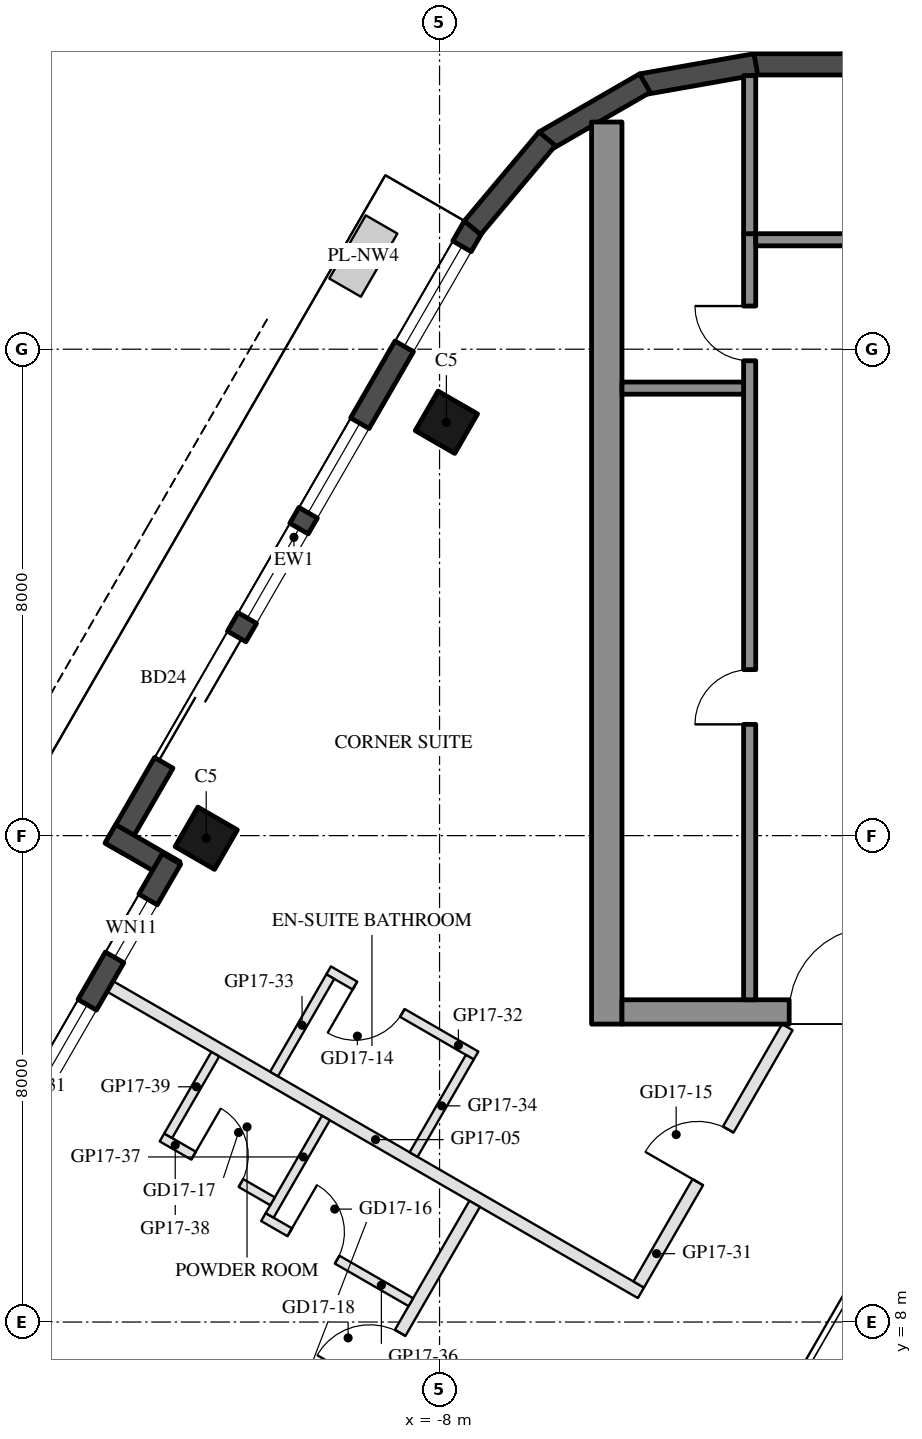
"""IFC4 building model, lengths in metres.
Left out: names, types, materials, properties, quantities, classifications, styles, units other than length and angle.
Written with IfcOpenShell. Run it as: python <this file> out.ifc"""

import sys

from ifc_helpers import new_model, si_unit, direction, frame, frame_2d, origin, origin_2d, place, context, subcontext, project, spatial, rectangle, hollow_rectangle, extrude, element, fill, save


model = new_model("IFC4")
c1 = context("Model", 3, precision=1e-05, world=origin(), true_north=direction((0.0, 1.0)))
c2 = subcontext(c1, "Body", "Model", "MODEL_VIEW")
j1 = project(units=[si_unit("LENGTHUNIT", "METRE"), si_unit("PLANEANGLEUNIT", "RADIAN")], contexts=[c1])
p1 = place(None, origin())
s1 = spatial("IfcSite", under=j1, at=p1, CompositionType="ELEMENT")
p2 = place(p1, origin())
s2 = spatial("IfcBuilding", under=s1, at=p2, CompositionType="ELEMENT")
p3 = place(p2, frame((0.0, 0.0, 187.3)))
s3 = spatial("IfcBuildingStorey", under=s2, at=p3, CompositionType="ELEMENT", Elevation=187.3)
for number, where, z_axis, x_axis in (
    (1, (-7.888, 22.798, 0.0), (0.0, 0.0, 1.0), (0.5, 0.866, 0.0)),
    (2, (-11.838, 15.957, 0.0), (0.0, 0.0, 1.0), (0.5, 0.866, 0.0)),
):
    element("IfcColumn", number, at=place(p3, frame(where, z_axis=z_axis, x_axis=x_axis)), inside=s3, PredefinedType="COLUMN", context=c2, shape_type="SweptSolid", body=[
        extrude(hollow_rectangle(XDim=0.75, YDim=0.75, WallThickness=0.035, at=origin_2d()), origin(), (0.0, 0.0, 1.0), 3.7),
    ])
p4 = place(p3, frame((-7.441, 26.022, 0.0), z_axis=(0.0, 0.0, 1.0), x_axis=(-0.499992533062, -0.86602971478, 0.0)))
e3 = element("IfcWall", 3, at=p4, inside=s3, PredefinedType="SOLIDWALL", context=c2, shape_type="SweptSolid", body=[
    extrude(rectangle(XDim=11.816, YDim=0.35, at=frame_2d((5.908, 0.0))), origin(), (0.0, 0.0, 1.0), 3.55),
])
p5 = place(p4, frame((0.381, 0.0, 0.3)))
e4 = element("IfcOpeningElement", 4, at=p5, cuts=e3, PredefinedType="OPENING", context=c2, shape_type="SweptSolid", body=[
    extrude(rectangle(XDim=1.9, YDim=2.65, at=frame_2d((0.95, 1.325))), frame((0.0, 0.185, 0.0), z_axis=(0.0, -1.0, 0.0), x_axis=(1.0, 0.0, 0.0)), (0.0, 0.0, 1.0), 0.37),
])
p6 = place(p4, frame((7.791, 0.0, 0.0)))
e5 = element("IfcOpeningElement", 5, at=p6, cuts=e3, PredefinedType="OPENING", context=c2, shape_type="SweptSolid", body=[
    extrude(rectangle(XDim=2.4, YDim=2.4, at=frame_2d((1.2, 1.2))), frame((0.0, 0.185, 0.0), z_axis=(0.0, -1.0, 0.0), x_axis=(1.0, 0.0, 0.0)), (0.0, 0.0, 1.0), 0.37),
])
p7 = place(p4, frame((3.741, 0.0, 0.3)))
e6 = element("IfcOpeningElement", 6, at=p7, cuts=e3, PredefinedType="OPENING", context=c2, shape_type="SweptSolid", body=[
    extrude(rectangle(XDim=1.7, YDim=2.65, at=frame_2d((0.85, 1.325))), frame((0.0, 0.185, 0.0), z_axis=(0.0, -1.0, 0.0), x_axis=(1.0, 0.0, 0.0)), (0.0, 0.0, 1.0), 0.37),
])
p8 = place(p4, frame((5.741, 0.0, 0.3)))
e7 = element("IfcOpeningElement", 7, at=p8, cuts=e3, PredefinedType="OPENING", context=c2, shape_type="SweptSolid", body=[
    extrude(rectangle(XDim=1.7, YDim=2.65, at=frame_2d((0.85, 1.325))), frame((0.0, 0.185, 0.0), z_axis=(0.0, -1.0, 0.0), x_axis=(1.0, 0.0, 0.0)), (0.0, 0.0, 1.0), 0.37),
])
p9 = place(p3, frame((-13.413, 16.029, 0.0), z_axis=(0.0, 0.0, 1.0), x_axis=(0.866005645448, -0.500034220881, 0.0)))
e8 = element("IfcWall", 8, at=p9, inside=s3, PredefinedType="SOLIDWALL", context=c2, shape_type="SweptSolid", body=[
    extrude(rectangle(XDim=1.22, YDim=0.35, at=frame_2d((0.61, 0.0))), origin(), (0.0, 0.0, 1.0), 3.55),
])
p10 = place(p3, frame((-12.409, 15.617, 0.0), z_axis=(0.0, 0.0, 1.0), x_axis=(-0.500003597184, -0.866023326939, 0.0)))
e9 = element("IfcWall", 9, at=p10, inside=s3, PredefinedType="SOLIDWALL", context=c2, shape_type="SweptSolid", body=[
    extrude(rectangle(XDim=6.74, YDim=0.35, at=frame_2d((3.37, 0.0))), origin(), (0.0, 0.0, 1.0), 3.55),
])
p11 = place(p10, frame((0.77, 0.0, 0.3)))
e10 = element("IfcOpeningElement", 10, at=p11, cuts=e9, PredefinedType="OPENING", context=c2, shape_type="SweptSolid", body=[
    extrude(rectangle(XDim=1.1, YDim=2.65, at=frame_2d((0.55, 1.325))), frame((0.0, 0.185, 0.0), z_axis=(0.0, -1.0, 0.0), x_axis=(1.0, 0.0, 0.0)), (0.0, 0.0, 1.0), 0.37),
])
p12 = place(p10, frame((2.77, 0.0, 0.3)))
e11 = element("IfcOpeningElement", 11, at=p12, cuts=e9, PredefinedType="OPENING", context=c2, shape_type="SweptSolid", body=[
    extrude(rectangle(XDim=3.1, YDim=2.65, at=frame_2d((1.55, 1.325))), frame((0.0, 0.185, 0.0), z_axis=(0.0, -1.0, 0.0), x_axis=(1.0, 0.0, 0.0)), (0.0, 0.0, 1.0), 0.37),
])
p13 = place(p3, frame((2.829, 28.685, 0.0), z_axis=(0.0, 0.0, 1.0), x_axis=(-1.0, 0.0, 0.0)))
e12 = element("IfcWall", 12, at=p13, inside=s3, PredefinedType="SOLIDWALL", context=c2, shape_type="SweptSolid", body=[
    extrude(rectangle(XDim=5.658, YDim=0.35, at=frame_2d((2.829, 0.0))), origin(), (0.0, 0.0, 1.0), 3.55),
])
for number, where, z_axis, x_axis in (
    (13, (-2.799, 28.688, 0.0), (0.0, 0.0, 1.0), (-0.985, -0.174, 0.0)),
    (14, (-4.623, 28.377, 0.0), (0.0, 0.0, 1.0), (-0.866, -0.5, 0.0)),
):
    element("IfcWall", number, at=place(p3, frame(where, z_axis=z_axis, x_axis=x_axis)), inside=s3, PredefinedType="SOLIDWALL", context=c2, shape_type="SweptSolid", body=[
        extrude(rectangle(XDim=1.91, YDim=0.35, at=frame_2d((0.955, 0.0))), origin(), (0.0, 0.0, 1.0), 3.55),
    ])
p14 = place(p3, frame((-6.23, 27.461, 0.0), z_axis=(0.0, 0.0, 1.0), x_axis=(-0.642808304945, -0.766027077259, 0.0)))
e15 = element("IfcWall", 15, at=p14, inside=s3, PredefinedType="SOLIDWALL", context=c2, shape_type="SweptSolid", body=[
    extrude(rectangle(XDim=1.91, YDim=0.35, at=frame_2d((0.955, 0.0))), origin(), (0.0, 0.0, 1.0), 3.55),
])
p15 = place(p3, frame((-5.25, 12.9, 0.0), z_axis=(0.0, 0.0, 1.0), x_axis=(0.0, 1.0, 0.0)))
e16 = element("IfcWall", 16, at=p15, inside=s3, PredefinedType="SHEAR", context=c2, shape_type="SweptSolid", body=[
    extrude(rectangle(XDim=14.837, YDim=0.5, at=frame_2d((7.418, 0.0))), origin(), (0.0, 0.0, 1.0), 3.5),
])
p16 = place(p3, frame((5.0, 13.1, 0.0), z_axis=(0.0, 0.0, 1.0), x_axis=(-1.0, 0.0, 0.0)))
e17 = element("IfcWall", 17, at=p16, inside=s3, PredefinedType="SHEAR", context=c2, shape_type="SweptSolid", body=[
    extrude(rectangle(XDim=10.0, YDim=0.4, at=frame_2d((5.0, 0.0))), origin(), (0.0, 0.0, 1.0), 3.5),
])
p17 = place(p16, frame((3.55, 0.0, 0.0)))
e18 = element("IfcOpeningElement", 18, at=p17, cuts=e17, PredefinedType="OPENING", context=c2, shape_type="SweptSolid", body=[
    extrude(rectangle(XDim=1.1, YDim=2.1, at=frame_2d((0.55, 1.05))), frame((0.0, 0.21, 0.0), z_axis=(0.0, -1.0, 0.0), x_axis=(1.0, 0.0, 0.0)), (0.0, 0.0, 1.0), 0.42),
])
p18 = place(p16, frame((5.85, 0.0, 0.0)))
e19 = element("IfcOpeningElement", 19, at=p18, cuts=e17, PredefinedType="OPENING", context=c2, shape_type="SweptSolid", body=[
    extrude(rectangle(XDim=1.4, YDim=2.1, at=frame_2d((0.7, 1.05))), frame((0.0, 0.21, 0.0), z_axis=(0.0, -1.0, 0.0), x_axis=(1.0, 0.0, 0.0)), (0.0, 0.0, 1.0), 0.42),
])
p19 = place(p3, frame((-2.9, 13.3, 0.0), z_axis=(0.0, 0.0, 1.0), x_axis=(0.0, 1.0, 0.0)))
e20 = element("IfcWall", 20, at=p19, inside=s3, PredefinedType="SHEAR", context=c2, shape_type="SweptSolid", body=[
    extrude(rectangle(XDim=12.6, YDim=0.2, at=frame_2d((6.3, 0.0))), origin(), (0.0, 0.0, 1.0), 3.5),
])
p20 = place(p19, frame((4.53, 0.0, 0.0)))
e21 = element("IfcOpeningElement", 21, at=p20, cuts=e20, PredefinedType="OPENING", context=c2, shape_type="SweptSolid", body=[
    extrude(rectangle(XDim=0.9, YDim=2.1, at=frame_2d((0.45, 1.05))), frame((0.0, 0.11, 0.0), z_axis=(0.0, -1.0, 0.0), x_axis=(1.0, 0.0, 0.0)), (0.0, 0.0, 1.0), 0.22),
])
p21 = place(p19, frame((10.51, 0.0, 0.0)))
e22 = element("IfcOpeningElement", 22, at=p21, cuts=e20, PredefinedType="OPENING", context=c2, shape_type="SweptSolid", body=[
    extrude(rectangle(XDim=0.9, YDim=2.1, at=frame_2d((0.45, 1.05))), frame((0.0, 0.11, 0.0), z_axis=(0.0, -1.0, 0.0), x_axis=(1.0, 0.0, 0.0)), (0.0, 0.0, 1.0), 0.22),
])
p22 = place(p3, frame((-0.4, 25.8, 0.0), z_axis=(0.0, 0.0, 1.0), x_axis=(-1.0, 0.0, 0.0)))
e23 = element("IfcWall", 23, at=p22, inside=s3, PredefinedType="SHEAR", context=c2, shape_type="SweptSolid", body=[
    extrude(rectangle(XDim=2.4, YDim=0.2, at=frame_2d((1.2, 0.0))), origin(), (0.0, 0.0, 1.0), 3.5),
])
p23 = place(p3, frame((-3.0, 23.36, 0.0), z_axis=(0.0, 0.0, 1.0), x_axis=(-1.0, 0.0, 0.0)))
e24 = element("IfcWall", 24, at=p23, inside=s3, PredefinedType="SHEAR", context=c2, shape_type="SweptSolid", body=[
    extrude(rectangle(XDim=2.0, YDim=0.2, at=frame_2d((1.0, 0.0))), origin(), (0.0, 0.0, 1.0), 3.5),
])
p24 = place(p3, frame((-2.9, 25.9, 0.0), z_axis=(0.0, 0.0, 1.0), x_axis=(0.0, 1.0, 0.0)))
e25 = element("IfcWall", 25, at=p24, inside=s3, PredefinedType="SHEAR", context=c2, shape_type="SweptSolid", body=[
    extrude(rectangle(XDim=2.6, YDim=0.2, at=frame_2d((1.3, 0.0))), origin(), (0.0, 0.0, 1.0), 3.5),
])
p25 = place(p3, frame((-13.417, 13.52, 0.0), z_axis=(0.0, 0.0, 1.0), x_axis=(0.866022637375, -0.500004791531, 0.0)))
e26 = element("IfcWall", 26, at=p25, inside=s3, PredefinedType="PARTITIONING", context=c2, shape_type="SweptSolid", body=[
    extrude(rectangle(XDim=10.08, YDim=0.2, at=frame_2d((5.04, 0.0))), origin(), (0.0, 0.0, 1.0), 3.06),
])
p26 = place(p3, frame((-4.725, 8.617, 0.0), z_axis=(0.0, 0.0, 1.0), x_axis=(0.499990498062, 0.866030889661, 0.0)))
e27 = element("IfcWall", 27, at=p26, inside=s3, PredefinedType="PARTITIONING", context=c2, shape_type="SweptSolid", body=[
    extrude(rectangle(XDim=4.888, YDim=0.2, at=frame_2d((2.444, 0.0))), origin(), (0.0, 0.0, 1.0), 2.95),
])
p27 = place(p26, frame((1.944, 0.0, 0.0)))
e28 = element("IfcOpeningElement", 28, at=p27, cuts=e27, PredefinedType="OPENING", context=c2, shape_type="SweptSolid", body=[
    extrude(rectangle(XDim=1.0, YDim=2.1, at=frame_2d((0.5, 1.05))), frame((0.0, 0.11, 0.0), z_axis=(0.0, -1.0, 0.0), x_axis=(1.0, 0.0, 0.0)), (0.0, 0.0, 1.0), 0.22),
])
p28 = place(p3, frame((-7.399, 12.384, 0.0), z_axis=(0.0, 0.0, 1.0), x_axis=(-0.866034573852, 0.49998411664, 0.0)))
e29 = element("IfcWall", 29, at=p28, inside=s3, PredefinedType="PARTITIONING", context=c2, shape_type="SweptSolid", body=[
    extrude(rectangle(XDim=2.8, YDim=0.15, at=frame_2d((1.4, 0.0))), origin(), (0.0, 0.0, 1.0), 3.55),
])
p29 = place(p28, frame((1.4, 0.0, 0.0)))
e30 = element("IfcOpeningElement", 30, at=p29, cuts=e29, PredefinedType="OPENING", context=c2, shape_type="SweptSolid", body=[
    extrude(rectangle(XDim=0.9, YDim=2.1, at=frame_2d((0.45, 1.05))), frame((0.0, 0.085, 0.0), z_axis=(0.0, -1.0, 0.0), x_axis=(1.0, 0.0, 0.0)), (0.0, 0.0, 1.0), 0.17),
])
for number, where, z_axis, x_axis in (
    (31, (-9.797, 13.681, 0.0), (0.0, 0.0, 1.0), (-0.5, -0.866, 0.0)),
    (32, (-7.502, 12.356, 0.0), (0.0, 0.0, 1.0), (-0.5, -0.866, 0.0)),
):
    element("IfcWall", number, at=place(p3, frame(where, z_axis=z_axis, x_axis=x_axis)), inside=s3, PredefinedType="PARTITIONING", context=c2, shape_type="SweptSolid", body=[
        extrude(rectangle(XDim=1.85, YDim=0.15, at=frame_2d((0.925, 0.0))), origin(), (0.0, 0.0, 1.0), 3.55),
    ])
p30 = place(p3, frame((-12.823, 0.591, 0.0), z_axis=(0.0, 0.0, 1.0), x_axis=(0.500012057535, 0.866018442252, 0.0)))
e33 = element("IfcWall", 33, at=p30, inside=s3, PredefinedType="PARTITIONING", context=c2, shape_type="SweptSolid", body=[
    extrude(rectangle(XDim=10.8, YDim=0.2, at=frame_2d((5.4, 0.0))), origin(), (0.0, 0.0, 1.0), 2.95),
])
p31 = place(p30, frame((7.35, 0.0, 0.0)))
e34 = element("IfcOpeningElement", 34, at=p31, cuts=e33, PredefinedType="OPENING", context=c2, shape_type="SweptSolid", body=[
    extrude(rectangle(XDim=1.0, YDim=2.1, at=frame_2d((0.5, 1.05))), frame((0.0, 0.11, 0.0), z_axis=(0.0, -1.0, 0.0), x_axis=(1.0, 0.0, 0.0)), (0.0, 0.0, 1.0), 0.22),
])
p32 = place(p3, frame((-10.897, 9.726, 0.0), z_axis=(0.0, 0.0, 1.0), x_axis=(0.866056369097, -0.49994636267, 0.0)))
e35 = element("IfcWall", 35, at=p32, inside=s3, PredefinedType="PARTITIONING", context=c2, shape_type="SweptSolid", body=[
    extrude(rectangle(XDim=2.8, YDim=0.15, at=frame_2d((1.4, 0.0))), origin(), (0.0, 0.0, 1.0), 3.55),
])
p33 = place(p32, frame((0.5, 0.0, 0.0)))
e36 = element("IfcOpeningElement", 36, at=p33, cuts=e35, PredefinedType="OPENING", context=c2, shape_type="SweptSolid", body=[
    extrude(rectangle(XDim=0.9, YDim=2.1, at=frame_2d((0.45, 1.05))), frame((0.0, 0.085, 0.0), z_axis=(0.0, -1.0, 0.0), x_axis=(1.0, 0.0, 0.0)), (0.0, 0.0, 1.0), 0.17),
])
p34 = place(p3, frame((-9.869, 11.356, 0.0), z_axis=(0.0, 0.0, 1.0), x_axis=(-0.500042316284, -0.866000971088, 0.0)))
e37 = element("IfcWall", 37, at=p34, inside=s3, PredefinedType="PARTITIONING", context=c2, shape_type="SweptSolid", body=[
    extrude(rectangle(XDim=1.85, YDim=0.15, at=frame_2d((0.925, 0.0))), origin(), (0.0, 0.0, 1.0), 2.95),
])
p35 = place(p3, frame((-12.565, 11.036, 0.0), z_axis=(0.0, 0.0, 1.0), x_axis=(0.866009402589, -0.500027713859, 0.0)))
e38 = element("IfcWall", 38, at=p35, inside=s3, PredefinedType="PARTITIONING", context=c2, shape_type="SweptSolid", body=[
    extrude(rectangle(XDim=2.1, YDim=0.15, at=frame_2d((1.05, 0.0))), origin(), (0.0, 0.0, 1.0), 3.55),
])
p36 = place(p35, frame((0.6, 0.0, 0.0)))
e39 = element("IfcOpeningElement", 39, at=p36, cuts=e38, PredefinedType="OPENING", context=c2, shape_type="SweptSolid", body=[
    extrude(rectangle(XDim=0.9, YDim=2.1, at=frame_2d((0.45, 1.05))), frame((0.0, 0.085, 0.0), z_axis=(0.0, -1.0, 0.0), x_axis=(1.0, 0.0, 0.0)), (0.0, 0.0, 1.0), 0.17),
])
p37 = place(p3, frame((-11.688, 12.406, 0.0), z_axis=(0.0, 0.0, 1.0), x_axis=(-0.499967891604, -0.866043940782, 0.0)))
e40 = element("IfcWall", 40, at=p37, inside=s3, PredefinedType="PARTITIONING", context=c2, shape_type="SweptSolid", body=[
    extrude(rectangle(XDim=1.55, YDim=0.15, at=frame_2d((0.775, 0.0))), origin(), (0.0, 0.0, 1.0), 2.95),
])
p38 = place(p5, origin())
e41 = element("IfcWindow", 41, at=p38, inside=s3, PartitioningType="SINGLE_PANEL", PredefinedType="WINDOW", context=c2, shape_type="SweptSolid", body=[
    extrude(rectangle(XDim=1.9, YDim=2.65, at=frame_2d((0.95, 1.325))), frame((0.0, 0.03, 0.0), z_axis=(0.0, -1.0, 0.0), x_axis=(1.0, 0.0, 0.0)), (0.0, 0.0, 1.0), 0.06),
])
fill(e4, e41)
p39 = place(p6, frame((2.4, 0.0, 0.0), z_axis=(0.0, 0.0, 1.0), x_axis=(-1.0, 0.0, 0.0)))
e42 = element("IfcDoor", 42, at=p39, inside=s3, OperationType="SLIDING_TO_LEFT", PredefinedType="DOOR", context=c2, shape_type="SweptSolid", body=[
    extrude(rectangle(XDim=2.4, YDim=2.4, at=frame_2d((1.2, 1.2))), frame((0.0, 0.025, 0.0), z_axis=(0.0, -1.0, 0.0), x_axis=(1.0, 0.0, 0.0)), (0.0, 0.0, 1.0), 0.05),
])
fill(e5, e42)
p40 = place(p7, origin())
e43 = element("IfcWindow", 43, at=p40, inside=s3, PartitioningType="SINGLE_PANEL", PredefinedType="WINDOW", context=c2, shape_type="SweptSolid", body=[
    extrude(rectangle(XDim=1.7, YDim=2.65, at=frame_2d((0.85, 1.325))), frame((0.0, 0.03, 0.0), z_axis=(0.0, -1.0, 0.0), x_axis=(1.0, 0.0, 0.0)), (0.0, 0.0, 1.0), 0.06),
])
fill(e6, e43)
p41 = place(p8, origin())
e44 = element("IfcWindow", 44, at=p41, inside=s3, PartitioningType="SINGLE_PANEL", PredefinedType="WINDOW", context=c2, shape_type="SweptSolid", body=[
    extrude(rectangle(XDim=1.7, YDim=2.65, at=frame_2d((0.85, 1.325))), frame((0.0, 0.03, 0.0), z_axis=(0.0, -1.0, 0.0), x_axis=(1.0, 0.0, 0.0)), (0.0, 0.0, 1.0), 0.06),
])
fill(e7, e44)
p42 = place(p11, origin())
e45 = element("IfcWindow", 45, at=p42, inside=s3, PartitioningType="SINGLE_PANEL", PredefinedType="WINDOW", context=c2, shape_type="SweptSolid", body=[
    extrude(rectangle(XDim=1.1, YDim=2.65, at=frame_2d((0.55, 1.325))), frame((0.0, 0.03, 0.0), z_axis=(0.0, -1.0, 0.0), x_axis=(1.0, 0.0, 0.0)), (0.0, 0.0, 1.0), 0.06),
])
fill(e10, e45)
p43 = place(p12, origin())
e46 = element("IfcWindow", 46, at=p43, inside=s3, PartitioningType="SINGLE_PANEL", PredefinedType="WINDOW", context=c2, shape_type="SweptSolid", body=[
    extrude(rectangle(XDim=3.1, YDim=2.65, at=frame_2d((1.55, 1.325))), frame((0.0, 0.03, 0.0), z_axis=(0.0, -1.0, 0.0), x_axis=(1.0, 0.0, 0.0)), (0.0, 0.0, 1.0), 0.06),
])
fill(e11, e46)
p44 = place(p20, origin())
e47 = element("IfcDoor", 47, at=p44, inside=s3, OperationType="SINGLE_SWING_LEFT", PredefinedType="DOOR", context=c2, shape_type="SweptSolid", body=[
    extrude(rectangle(XDim=0.9, YDim=2.1, at=frame_2d((0.45, 1.05))), frame((0.0, 0.025, 0.0), z_axis=(0.0, -1.0, 0.0), x_axis=(1.0, 0.0, 0.0)), (0.0, 0.0, 1.0), 0.05),
])
fill(e21, e47)
p45 = place(p21, origin())
e48 = element("IfcDoor", 48, at=p45, inside=s3, OperationType="SINGLE_SWING_RIGHT", PredefinedType="DOOR", context=c2, shape_type="SweptSolid", body=[
    extrude(rectangle(XDim=0.9, YDim=2.1, at=frame_2d((0.45, 1.05))), frame((0.0, 0.025, 0.0), z_axis=(0.0, -1.0, 0.0), x_axis=(1.0, 0.0, 0.0)), (0.0, 0.0, 1.0), 0.05),
])
fill(e22, e48)
p46 = place(p18, frame((1.4, 0.0, 0.0), z_axis=(0.0, 0.0, 1.0), x_axis=(-1.0, 0.0, 0.0)))
e49 = element("IfcDoor", 49, at=p46, inside=s3, OperationType="DOUBLE_DOOR_SINGLE_SWING", PredefinedType="DOOR", context=c2, shape_type="SweptSolid", body=[
    extrude(rectangle(XDim=1.4, YDim=2.1, at=frame_2d((0.7, 1.05))), frame((0.0, 0.025, 0.0), z_axis=(0.0, -1.0, 0.0), x_axis=(1.0, 0.0, 0.0)), (0.0, 0.0, 1.0), 0.05),
])
fill(e19, e49)
p47 = place(p29, origin())
e50 = element("IfcDoor", 50, at=p47, inside=s3, OperationType="SINGLE_SWING_RIGHT", PredefinedType="DOOR", context=c2, shape_type="SweptSolid", body=[
    extrude(rectangle(XDim=0.9, YDim=2.1, at=frame_2d((0.45, 1.05))), frame((0.0, 0.025, 0.0), z_axis=(0.0, -1.0, 0.0), x_axis=(1.0, 0.0, 0.0)), (0.0, 0.0, 1.0), 0.05),
])
fill(e30, e50)
p48 = place(p27, origin())
e51 = element("IfcDoor", 51, at=p48, inside=s3, OperationType="SINGLE_SWING_LEFT", PredefinedType="DOOR", context=c2, shape_type="SweptSolid", body=[
    extrude(rectangle(XDim=1.0, YDim=2.1, at=frame_2d((0.5, 1.05))), frame((0.0, 0.025, 0.0), z_axis=(0.0, -1.0, 0.0), x_axis=(1.0, 0.0, 0.0)), (0.0, 0.0, 1.0), 0.05),
])
fill(e28, e51)
p49 = place(p33, origin())
e52 = element("IfcDoor", 52, at=p49, inside=s3, OperationType="SINGLE_SWING_LEFT", PredefinedType="DOOR", context=c2, shape_type="SweptSolid", body=[
    extrude(rectangle(XDim=0.9, YDim=2.1, at=frame_2d((0.45, 1.05))), frame((0.0, 0.025, 0.0), z_axis=(0.0, -1.0, 0.0), x_axis=(1.0, 0.0, 0.0)), (0.0, 0.0, 1.0), 0.05),
])
fill(e36, e52)
p50 = place(p36, origin())
e53 = element("IfcDoor", 53, at=p50, inside=s3, OperationType="SINGLE_SWING_LEFT", PredefinedType="DOOR", context=c2, shape_type="SweptSolid", body=[
    extrude(rectangle(XDim=0.9, YDim=2.1, at=frame_2d((0.45, 1.05))), frame((0.0, 0.025, 0.0), z_axis=(0.0, -1.0, 0.0), x_axis=(1.0, 0.0, 0.0)), (0.0, 0.0, 1.0), 0.05),
])
fill(e39, e53)
p51 = place(p31, origin())
e54 = element("IfcDoor", 54, at=p51, inside=s3, OperationType="SINGLE_SWING_LEFT", PredefinedType="DOOR", context=c2, shape_type="SweptSolid", body=[
    extrude(rectangle(XDim=1.0, YDim=2.1, at=frame_2d((0.5, 1.05))), frame((0.0, 0.025, 0.0), z_axis=(0.0, -1.0, 0.0), x_axis=(1.0, 0.0, 0.0)), (0.0, 0.0, 1.0), 0.05),
])
fill(e34, e54)
save(model, sys.argv[1])
